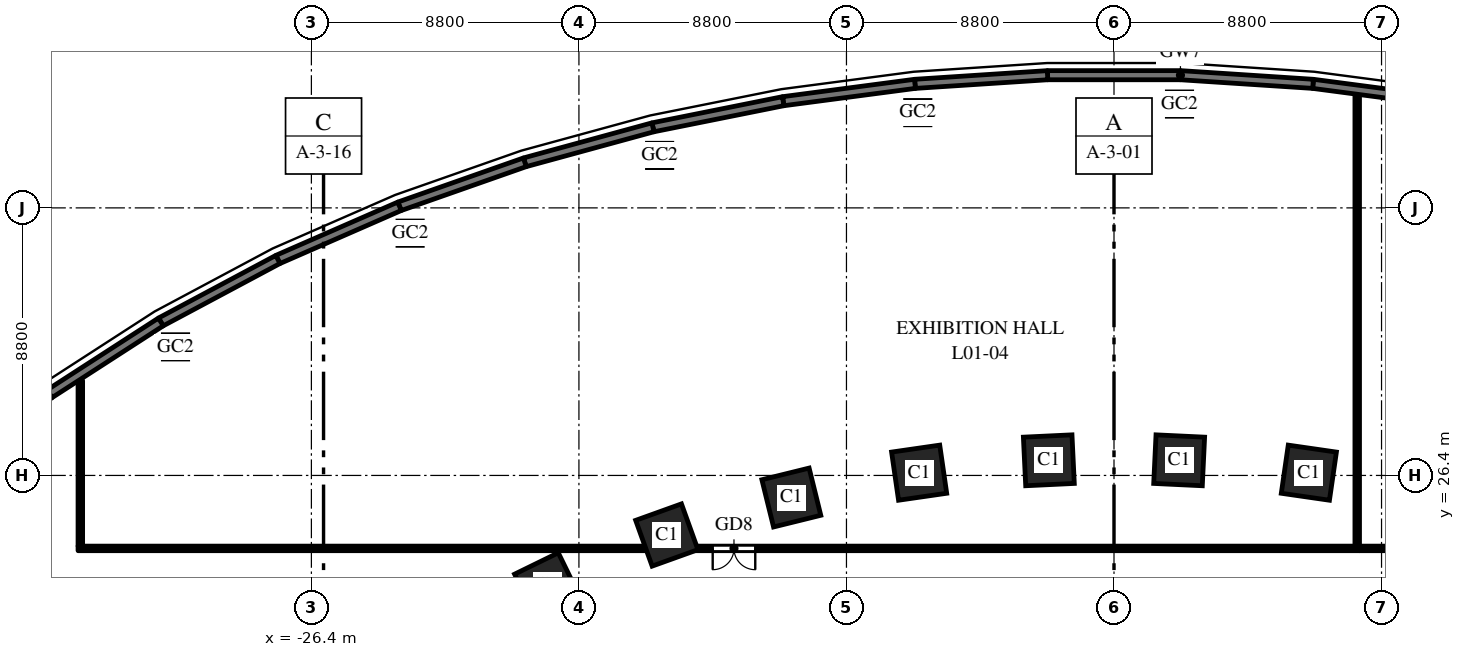
"""IFC4 building model, lengths in metres.
Left out: names, types, materials, properties, quantities, classifications, styles, units other than length and angle.
Written with IfcOpenShell. Run it as: python <this file> out.ifc"""

import sys

from ifc_helpers import new_model, si_unit, direction, frame, frame_2d, origin, origin_2d, place, context, subcontext, project, spatial, rectangle, hollow_rectangle, extrude, element, fill, save


model = new_model("IFC4")
c1 = context("Model", 3, precision=1e-05, world=origin(), true_north=direction((0.0, 1.0)))
c2 = subcontext(c1, "Body", "Model", "MODEL_VIEW")
j1 = project(units=[si_unit("LENGTHUNIT", "METRE"), si_unit("PLANEANGLEUNIT", "RADIAN")], contexts=[c1])
p1 = place(None, origin())
s1 = spatial("IfcSite", under=j1, at=p1, CompositionType="ELEMENT")
p2 = place(p1, origin())
s2 = spatial("IfcBuilding", under=s1, at=p2, CompositionType="ELEMENT")
p3 = place(p2, frame((0.0, 0.0, 7.5)))
s3 = spatial("IfcBuildingStorey", under=s2, at=p3, CompositionType="ELEMENT", Elevation=7.5)
for number, where, z_axis, x_axis in (
    (1, (6.409, 26.491, 0.0), (0.0, 0.0, 1.0), (-0.99, 0.143, 0.0)),
    (2, (2.143, 26.898, 0.0), (0.0, 0.0, 1.0), (-0.999, 0.048, 0.0)),
    (3, (-2.143, 26.898, 0.0), (0.0, 0.0, 1.0), (-0.999, -0.048, 0.0)),
    (4, (-6.409, 26.491, 0.0), (0.0, 0.0, 1.0), (-0.99, -0.143, 0.0)),
    (5, (-10.613, 25.674, 0.0), (0.0, 0.0, 1.0), (-0.971, -0.24, 0.0)),
    (6, (-14.709, 24.441, 0.0), (0.0, 0.0, 1.0), (-0.941, -0.338, 0.0)),
    (7, (-18.646, 22.785, 0.0), (0.0, 0.0, 1.0), (-0.898, -0.439, 0.0)),
):
    element("IfcColumn", number, at=place(p3, frame(where, z_axis=z_axis, x_axis=x_axis)), inside=s3, PredefinedType="COLUMN", context=c2, shape_type="SweptSolid", body=[
        extrude(rectangle(XDim=1.6, YDim=1.6, at=origin_2d()), origin(), (0.0, 0.0, 1.0), 6.0),
    ])
for number, where, z_axis, x_axis in (
    (8, (2.155, 38.614, 0.0), (0.0, 0.0, 1.0), (1.0, 0.0, 0.0)),
    (9, (-6.454, 38.333, 0.0), (0.0, 0.0, 1.0), (1.0, 0.0, 0.0)),
    (10, (-14.946, 36.925, 0.0), (0.0, 0.0, 1.0), (1.0, 0.0, 0.0)),
    (11, (-23.153, 34.368, 0.0), (0.0, 0.0, 1.0), (1.0, 0.0, 0.0)),
    (12, (-30.869, 30.629, 0.0), (0.0, 0.0, 1.0), (1.0, 0.0, 0.0)),
):
    element("IfcColumn", number, at=place(p3, frame(where, z_axis=z_axis, x_axis=x_axis)), inside=s3, PredefinedType="COLUMN", context=c2, shape_type="SweptSolid", body=[
        extrude(hollow_rectangle(XDim=0.8, YDim=0.8, WallThickness=0.04, at=origin_2d()), origin(), (0.0, 0.0, 1.0), 6.0),
    ])
p4 = place(p3, frame((8.0, 38.934, 0.0), z_axis=(0.0, 0.0, 1.0), x_axis=(0.0, -1.0, 0.0)))
e13 = element("IfcWall", 13, at=p4, inside=s3, PredefinedType="PARTITIONING", context=c2, shape_type="SweptSolid", body=[
    extrude(rectangle(XDim=14.859, YDim=0.15, at=frame_2d((7.43, 0.0))), origin(), (0.0, 0.0, 1.0), 4.75),
])
p5 = place(p3, frame((-34.0, 24.075, 0.0), z_axis=(0.0, 0.0, 1.0), x_axis=(0.0, 1.0, 0.0)))
e14 = element("IfcWall", 14, at=p5, inside=s3, PredefinedType="PARTITIONING", context=c2, shape_type="SweptSolid", body=[
    extrude(rectangle(XDim=5.445, YDim=0.15, at=frame_2d((2.722, 0.0))), origin(), (0.0, 0.0, 1.0), 5.15),
])
p6 = place(p3, frame((8.075, 24.0, 0.0), z_axis=(0.0, 0.0, 1.0), x_axis=(-1.0, 0.0, 0.0)))
e15 = element("IfcWall", 15, at=p6, inside=s3, PredefinedType="PARTITIONING", context=c2, shape_type="SweptSolid", body=[
    extrude(rectangle(XDim=42.15, YDim=0.15, at=frame_2d((21.075, 0.0))), origin(), (0.0, 0.0, 1.0), 4.75),
])
p7 = place(p6, frame((19.875, 0.0, 0.0)))
e16 = element("IfcOpeningElement", 16, at=p7, cuts=e15, PredefinedType="OPENING", context=c2, shape_type="SweptSolid", body=[
    extrude(rectangle(XDim=1.4, YDim=2.1, at=frame_2d((0.7, 1.05))), frame((0.0, 0.085, 0.0), z_axis=(0.0, -1.0, 0.0), x_axis=(1.0, 0.0, 0.0)), (0.0, 0.0, 1.0), 0.17),
])
p8 = place(p3, frame((31.075, 24.0, 0.0), z_axis=(0.0, 0.0, 1.0), x_axis=(-1.0, 0.0, 0.0)))
e17 = element("IfcWall", 17, at=p8, inside=s3, PredefinedType="PARTITIONING", context=c2, shape_type="SweptSolid", body=[
    extrude(rectangle(XDim=23.001, YDim=0.15, at=frame_2d((11.5, 0.0))), origin(), (0.0, 0.0, 1.0), 4.75),
])
p9 = place(p8, frame((9.801, 0.0, 0.0)))
e18 = element("IfcOpeningElement", 18, at=p9, cuts=e17, PredefinedType="OPENING", context=c2, shape_type="SweptSolid", body=[
    extrude(rectangle(XDim=1.4, YDim=2.1, at=frame_2d((0.7, 1.05))), frame((0.0, 0.085, 0.0), z_axis=(0.0, -1.0, 0.0), x_axis=(1.0, 0.0, 0.0)), (0.0, 0.0, 1.0), 0.17),
])
p10 = place(p3, frame((10.88, 38.709, 0.0), z_axis=(0.0, 0.0, 1.0), x_axis=(-0.991441741932, 0.130549884544, 0.0)))
e19 = element("IfcWall", 19, at=p10, inside=s3, PredefinedType="SOLIDWALL", context=c2, shape_type="SweptSolid", body=[
    extrude(rectangle(XDim=4.37, YDim=0.3, at=frame_2d((2.185, 0.0))), origin(), (0.0, 0.0, 1.0), 5.75),
])
p11 = place(p10, frame((0.305, 0.0, 1.0)))
e20 = element("IfcOpeningElement", 20, at=p11, cuts=e19, PredefinedType="OPENING", context=c2, shape_type="SweptSolid", body=[
    extrude(rectangle(XDim=2.4, YDim=3.0, at=frame_2d((1.2, 1.5))), frame((0.0, 0.16, 0.0), z_axis=(0.0, -1.0, 0.0), x_axis=(1.0, 0.0, 0.0)), (0.0, 0.0, 1.0), 0.32),
])
p12 = place(p3, frame((6.547, 39.28, 0.0), z_axis=(0.0, 0.0, 1.0), x_axis=(-0.997876871627, 0.065128711577, 0.0)))
e21 = element("IfcWall", 21, at=p12, inside=s3, PredefinedType="SOLIDWALL", context=c2, shape_type="SweptSolid", body=[
    extrude(rectangle(XDim=4.371, YDim=0.3, at=frame_2d((2.186, 0.0))), origin(), (0.0, 0.0, 1.0), 5.75),
])
p13 = place(p12, frame((0.985, 0.0, 1.0)))
e22 = element("IfcOpeningElement", 22, at=p13, cuts=e21, PredefinedType="OPENING", context=c2, shape_type="SweptSolid", body=[
    extrude(rectangle(XDim=2.4, YDim=3.0, at=frame_2d((1.2, 1.5))), frame((0.0, 0.16, 0.0), z_axis=(0.0, -1.0, 0.0), x_axis=(1.0, 0.0, 0.0)), (0.0, 0.0, 1.0), 0.32),
])
p14 = place(p3, frame((2.186, 39.564, 0.0), z_axis=(0.0, 0.0, 1.0), x_axis=(-1.0, 0.0, 0.0)))
e23 = element("IfcWall", 23, at=p14, inside=s3, PredefinedType="SOLIDWALL", context=c2, shape_type="SweptSolid", body=[
    extrude(rectangle(XDim=4.371, YDim=0.3, at=frame_2d((2.186, 0.0))), origin(), (0.0, 0.0, 1.0), 5.75),
])
p15 = place(p14, frame((0.986, 0.0, 1.0)))
e24 = element("IfcOpeningElement", 24, at=p15, cuts=e23, PredefinedType="OPENING", context=c2, shape_type="SweptSolid", body=[
    extrude(rectangle(XDim=2.4, YDim=3.0, at=frame_2d((1.2, 1.5))), frame((0.0, 0.16, 0.0), z_axis=(0.0, -1.0, 0.0), x_axis=(1.0, 0.0, 0.0)), (0.0, 0.0, 1.0), 0.32),
])
p16 = place(p3, frame((-2.186, 39.564, 0.0), z_axis=(0.0, 0.0, 1.0), x_axis=(-0.997876871627, -0.065128711577, 0.0)))
e25 = element("IfcWall", 25, at=p16, inside=s3, PredefinedType="SOLIDWALL", context=c2, shape_type="SweptSolid", body=[
    extrude(rectangle(XDim=4.371, YDim=0.3, at=frame_2d((2.186, 0.0))), origin(), (0.0, 0.0, 1.0), 5.75),
])
p17 = place(p16, frame((0.985, 0.0, 1.0)))
e26 = element("IfcOpeningElement", 26, at=p17, cuts=e25, PredefinedType="OPENING", context=c2, shape_type="SweptSolid", body=[
    extrude(rectangle(XDim=2.4, YDim=3.0, at=frame_2d((1.2, 1.5))), frame((0.0, 0.16, 0.0), z_axis=(0.0, -1.0, 0.0), x_axis=(1.0, 0.0, 0.0)), (0.0, 0.0, 1.0), 0.32),
])
p18 = place(p3, frame((-6.547, 39.28, 0.0), z_axis=(0.0, 0.0, 1.0), x_axis=(-0.991441741932, -0.130549884544, 0.0)))
e27 = element("IfcWall", 27, at=p18, inside=s3, PredefinedType="SOLIDWALL", context=c2, shape_type="SweptSolid", body=[
    extrude(rectangle(XDim=4.37, YDim=0.3, at=frame_2d((2.185, 0.0))), origin(), (0.0, 0.0, 1.0), 5.75),
])
p19 = place(p18, frame((0.985, 0.0, 1.0)))
e28 = element("IfcOpeningElement", 28, at=p19, cuts=e27, PredefinedType="OPENING", context=c2, shape_type="SweptSolid", body=[
    extrude(rectangle(XDim=2.4, YDim=3.0, at=frame_2d((1.2, 1.5))), frame((0.0, 0.16, 0.0), z_axis=(0.0, -1.0, 0.0), x_axis=(1.0, 0.0, 0.0)), (0.0, 0.0, 1.0), 0.32),
])
p20 = place(p3, frame((-10.88, 38.709, 0.0), z_axis=(0.0, 0.0, 1.0), x_axis=(-0.980494629762, -0.196545875071, 0.0)))
e29 = element("IfcWall", 29, at=p20, inside=s3, PredefinedType="SOLIDWALL", context=c2, shape_type="SweptSolid", body=[
    extrude(rectangle(XDim=4.37, YDim=0.3, at=frame_2d((2.185, 0.0))), origin(), (0.0, 0.0, 1.0), 5.75),
])
p21 = place(p20, frame((0.985, 0.0, 1.0)))
e30 = element("IfcOpeningElement", 30, at=p21, cuts=e29, PredefinedType="OPENING", context=c2, shape_type="SweptSolid", body=[
    extrude(rectangle(XDim=2.4, YDim=3.0, at=frame_2d((1.2, 1.5))), frame((0.0, 0.16, 0.0), z_axis=(0.0, -1.0, 0.0), x_axis=(1.0, 0.0, 0.0)), (0.0, 0.0, 1.0), 0.32),
])
p22 = place(p3, frame((-15.165, 37.85, 0.0), z_axis=(0.0, 0.0, 1.0), x_axis=(-0.964679950239, -0.263424739931, 0.0)))
e31 = element("IfcWall", 31, at=p22, inside=s3, PredefinedType="SOLIDWALL", context=c2, shape_type="SweptSolid", body=[
    extrude(rectangle(XDim=4.369, YDim=0.3, at=frame_2d((2.185, 0.0))), origin(), (0.0, 0.0, 1.0), 5.75),
])
p23 = place(p22, frame((0.985, 0.0, 1.0)))
e32 = element("IfcOpeningElement", 32, at=p23, cuts=e31, PredefinedType="OPENING", context=c2, shape_type="SweptSolid", body=[
    extrude(rectangle(XDim=2.4, YDim=3.0, at=frame_2d((1.2, 1.5))), frame((0.0, 0.16, 0.0), z_axis=(0.0, -1.0, 0.0), x_axis=(1.0, 0.0, 0.0)), (0.0, 0.0, 1.0), 0.32),
])
p24 = place(p3, frame((-19.379, 36.699, 0.0), z_axis=(0.0, 0.0, 1.0), x_axis=(-0.943526738033, -0.331296384853, 0.0)))
e33 = element("IfcWall", 33, at=p24, inside=s3, PredefinedType="SOLIDWALL", context=c2, shape_type="SweptSolid", body=[
    extrude(rectangle(XDim=4.368, YDim=0.3, at=frame_2d((2.184, 0.0))), origin(), (0.0, 0.0, 1.0), 5.75),
])
p25 = place(p24, frame((0.984, 0.0, 1.0)))
e34 = element("IfcOpeningElement", 34, at=p25, cuts=e33, PredefinedType="OPENING", context=c2, shape_type="SweptSolid", body=[
    extrude(rectangle(XDim=2.4, YDim=3.0, at=frame_2d((1.2, 1.5))), frame((0.0, 0.16, 0.0), z_axis=(0.0, -1.0, 0.0), x_axis=(1.0, 0.0, 0.0)), (0.0, 0.0, 1.0), 0.32),
])
p26 = place(p3, frame((-23.5, 35.252, 0.0), z_axis=(0.0, 0.0, 1.0), x_axis=(-0.916336904548, -0.400408138483, 0.0)))
e35 = element("IfcWall", 35, at=p26, inside=s3, PredefinedType="SOLIDWALL", context=c2, shape_type="SweptSolid", body=[
    extrude(rectangle(XDim=4.366, YDim=0.3, at=frame_2d((2.183, 0.0))), origin(), (0.0, 0.0, 1.0), 5.75),
])
p27 = place(p26, frame((0.983, 0.0, 1.0)))
e36 = element("IfcOpeningElement", 36, at=p27, cuts=e35, PredefinedType="OPENING", context=c2, shape_type="SweptSolid", body=[
    extrude(rectangle(XDim=2.4, YDim=3.0, at=frame_2d((1.2, 1.5))), frame((0.0, 0.16, 0.0), z_axis=(0.0, -1.0, 0.0), x_axis=(1.0, 0.0, 0.0)), (0.0, 0.0, 1.0), 0.32),
])
p28 = place(p3, frame((-27.501, 33.504, 0.0), z_axis=(0.0, 0.0, 1.0), x_axis=(-0.882159305704, -0.47095112205, 0.0)))
e37 = element("IfcWall", 37, at=p28, inside=s3, PredefinedType="SOLIDWALL", context=c2, shape_type="SweptSolid", body=[
    extrude(rectangle(XDim=4.365, YDim=0.3, at=frame_2d((2.182, 0.0))), origin(), (0.0, 0.0, 1.0), 5.75),
])
p29 = place(p28, frame((0.982, 0.0, 1.0)))
e38 = element("IfcOpeningElement", 38, at=p29, cuts=e37, PredefinedType="OPENING", context=c2, shape_type="SweptSolid", body=[
    extrude(rectangle(XDim=2.4, YDim=3.0, at=frame_2d((1.2, 1.5))), frame((0.0, 0.16, 0.0), z_axis=(0.0, -1.0, 0.0), x_axis=(1.0, 0.0, 0.0)), (0.0, 0.0, 1.0), 0.32),
])
p30 = place(p3, frame((-31.352, 31.448, 0.0), z_axis=(0.0, 0.0, 1.0), x_axis=(-0.840047348843, -0.542513088969, 0.0)))
e39 = element("IfcWall", 39, at=p30, inside=s3, PredefinedType="SOLIDWALL", context=c2, shape_type="SweptSolid", body=[
    extrude(rectangle(XDim=4.362, YDim=0.3, at=frame_2d((2.181, 0.0))), origin(), (0.0, 0.0, 1.0), 5.75),
])
p31 = place(p30, frame((0.691, 0.0, 1.0)))
e40 = element("IfcOpeningElement", 40, at=p31, cuts=e39, PredefinedType="OPENING", context=c2, shape_type="SweptSolid", body=[
    extrude(rectangle(XDim=2.4, YDim=3.0, at=frame_2d((1.2, 1.5))), frame((0.0, 0.16, 0.0), z_axis=(0.0, -1.0, 0.0), x_axis=(1.0, 0.0, 0.0)), (0.0, 0.0, 1.0), 0.32),
])
p32 = place(p3, frame((-35.016, 29.082, 0.0), z_axis=(0.0, 0.0, 1.0), x_axis=(-0.788491985196, -0.615045030288, 0.0)))
e41 = element("IfcWall", 41, at=p32, inside=s3, PredefinedType="SOLIDWALL", context=c2, shape_type="SweptSolid", body=[
    extrude(rectangle(XDim=4.359, YDim=0.3, at=frame_2d((2.18, 0.0))), origin(), (0.0, 0.0, 1.0), 5.75),
])
p33 = place(p32, frame((0.98, 0.0, 1.0)))
e42 = element("IfcOpeningElement", 42, at=p33, cuts=e41, PredefinedType="OPENING", context=c2, shape_type="SweptSolid", body=[
    extrude(rectangle(XDim=2.4, YDim=3.0, at=frame_2d((1.2, 1.5))), frame((0.0, 0.16, 0.0), z_axis=(0.0, -1.0, 0.0), x_axis=(1.0, 0.0, 0.0)), (0.0, 0.0, 1.0), 0.32),
])
p34 = place(p7, origin())
e43 = element("IfcDoor", 43, at=p34, inside=s3, OperationType="DOUBLE_DOOR_SINGLE_SWING", PredefinedType="DOOR", context=c2, shape_type="SweptSolid", body=[
    extrude(rectangle(XDim=1.4, YDim=2.1, at=frame_2d((0.7, 1.05))), frame((0.0, 0.025, 0.0), z_axis=(0.0, -1.0, 0.0), x_axis=(1.0, 0.0, 0.0)), (0.0, 0.0, 1.0), 0.05),
])
fill(e16, e43)
p35 = place(p11, origin())
e44 = element("IfcWindow", 44, at=p35, inside=s3, PartitioningType="SINGLE_PANEL", PredefinedType="WINDOW", context=c2, shape_type="SweptSolid", body=[
    extrude(rectangle(XDim=2.4, YDim=3.0, at=frame_2d((1.2, 1.5))), frame((0.0, 0.03, 0.0), z_axis=(0.0, -1.0, 0.0), x_axis=(1.0, 0.0, 0.0)), (0.0, 0.0, 1.0), 0.06),
])
fill(e20, e44)
p36 = place(p13, origin())
e45 = element("IfcWindow", 45, at=p36, inside=s3, PartitioningType="SINGLE_PANEL", PredefinedType="WINDOW", context=c2, shape_type="SweptSolid", body=[
    extrude(rectangle(XDim=2.4, YDim=3.0, at=frame_2d((1.2, 1.5))), frame((0.0, 0.03, 0.0), z_axis=(0.0, -1.0, 0.0), x_axis=(1.0, 0.0, 0.0)), (0.0, 0.0, 1.0), 0.06),
])
fill(e22, e45)
p37 = place(p15, origin())
e46 = element("IfcWindow", 46, at=p37, inside=s3, PartitioningType="SINGLE_PANEL", PredefinedType="WINDOW", context=c2, shape_type="SweptSolid", body=[
    extrude(rectangle(XDim=2.4, YDim=3.0, at=frame_2d((1.2, 1.5))), frame((0.0, 0.03, 0.0), z_axis=(0.0, -1.0, 0.0), x_axis=(1.0, 0.0, 0.0)), (0.0, 0.0, 1.0), 0.06),
])
fill(e24, e46)
p38 = place(p17, origin())
e47 = element("IfcWindow", 47, at=p38, inside=s3, PartitioningType="SINGLE_PANEL", PredefinedType="WINDOW", context=c2, shape_type="SweptSolid", body=[
    extrude(rectangle(XDim=2.4, YDim=3.0, at=frame_2d((1.2, 1.5))), frame((0.0, 0.03, 0.0), z_axis=(0.0, -1.0, 0.0), x_axis=(1.0, 0.0, 0.0)), (0.0, 0.0, 1.0), 0.06),
])
fill(e26, e47)
p39 = place(p19, origin())
e48 = element("IfcWindow", 48, at=p39, inside=s3, PartitioningType="SINGLE_PANEL", PredefinedType="WINDOW", context=c2, shape_type="SweptSolid", body=[
    extrude(rectangle(XDim=2.4, YDim=3.0, at=frame_2d((1.2, 1.5))), frame((0.0, 0.03, 0.0), z_axis=(0.0, -1.0, 0.0), x_axis=(1.0, 0.0, 0.0)), (0.0, 0.0, 1.0), 0.06),
])
fill(e28, e48)
p40 = place(p21, origin())
e49 = element("IfcWindow", 49, at=p40, inside=s3, PartitioningType="SINGLE_PANEL", PredefinedType="WINDOW", context=c2, shape_type="SweptSolid", body=[
    extrude(rectangle(XDim=2.4, YDim=3.0, at=frame_2d((1.2, 1.5))), frame((0.0, 0.03, 0.0), z_axis=(0.0, -1.0, 0.0), x_axis=(1.0, 0.0, 0.0)), (0.0, 0.0, 1.0), 0.06),
])
fill(e30, e49)
p41 = place(p23, origin())
e50 = element("IfcWindow", 50, at=p41, inside=s3, PartitioningType="SINGLE_PANEL", PredefinedType="WINDOW", context=c2, shape_type="SweptSolid", body=[
    extrude(rectangle(XDim=2.4, YDim=3.0, at=frame_2d((1.2, 1.5))), frame((0.0, 0.03, 0.0), z_axis=(0.0, -1.0, 0.0), x_axis=(1.0, 0.0, 0.0)), (0.0, 0.0, 1.0), 0.06),
])
fill(e32, e50)
p42 = place(p25, origin())
e51 = element("IfcWindow", 51, at=p42, inside=s3, PartitioningType="SINGLE_PANEL", PredefinedType="WINDOW", context=c2, shape_type="SweptSolid", body=[
    extrude(rectangle(XDim=2.4, YDim=3.0, at=frame_2d((1.2, 1.5))), frame((0.0, 0.03, 0.0), z_axis=(0.0, -1.0, 0.0), x_axis=(1.0, 0.0, 0.0)), (0.0, 0.0, 1.0), 0.06),
])
fill(e34, e51)
p43 = place(p27, origin())
e52 = element("IfcWindow", 52, at=p43, inside=s3, PartitioningType="SINGLE_PANEL", PredefinedType="WINDOW", context=c2, shape_type="SweptSolid", body=[
    extrude(rectangle(XDim=2.4, YDim=3.0, at=frame_2d((1.2, 1.5))), frame((0.0, 0.03, 0.0), z_axis=(0.0, -1.0, 0.0), x_axis=(1.0, 0.0, 0.0)), (0.0, 0.0, 1.0), 0.06),
])
fill(e36, e52)
p44 = place(p29, origin())
e53 = element("IfcWindow", 53, at=p44, inside=s3, PartitioningType="SINGLE_PANEL", PredefinedType="WINDOW", context=c2, shape_type="SweptSolid", body=[
    extrude(rectangle(XDim=2.4, YDim=3.0, at=frame_2d((1.2, 1.5))), frame((0.0, 0.03, 0.0), z_axis=(0.0, -1.0, 0.0), x_axis=(1.0, 0.0, 0.0)), (0.0, 0.0, 1.0), 0.06),
])
fill(e38, e53)
p45 = place(p31, origin())
e54 = element("IfcWindow", 54, at=p45, inside=s3, PartitioningType="SINGLE_PANEL", PredefinedType="WINDOW", context=c2, shape_type="SweptSolid", body=[
    extrude(rectangle(XDim=2.4, YDim=3.0, at=frame_2d((1.2, 1.5))), frame((0.0, 0.03, 0.0), z_axis=(0.0, -1.0, 0.0), x_axis=(1.0, 0.0, 0.0)), (0.0, 0.0, 1.0), 0.06),
])
fill(e40, e54)
save(model, sys.argv[1])
